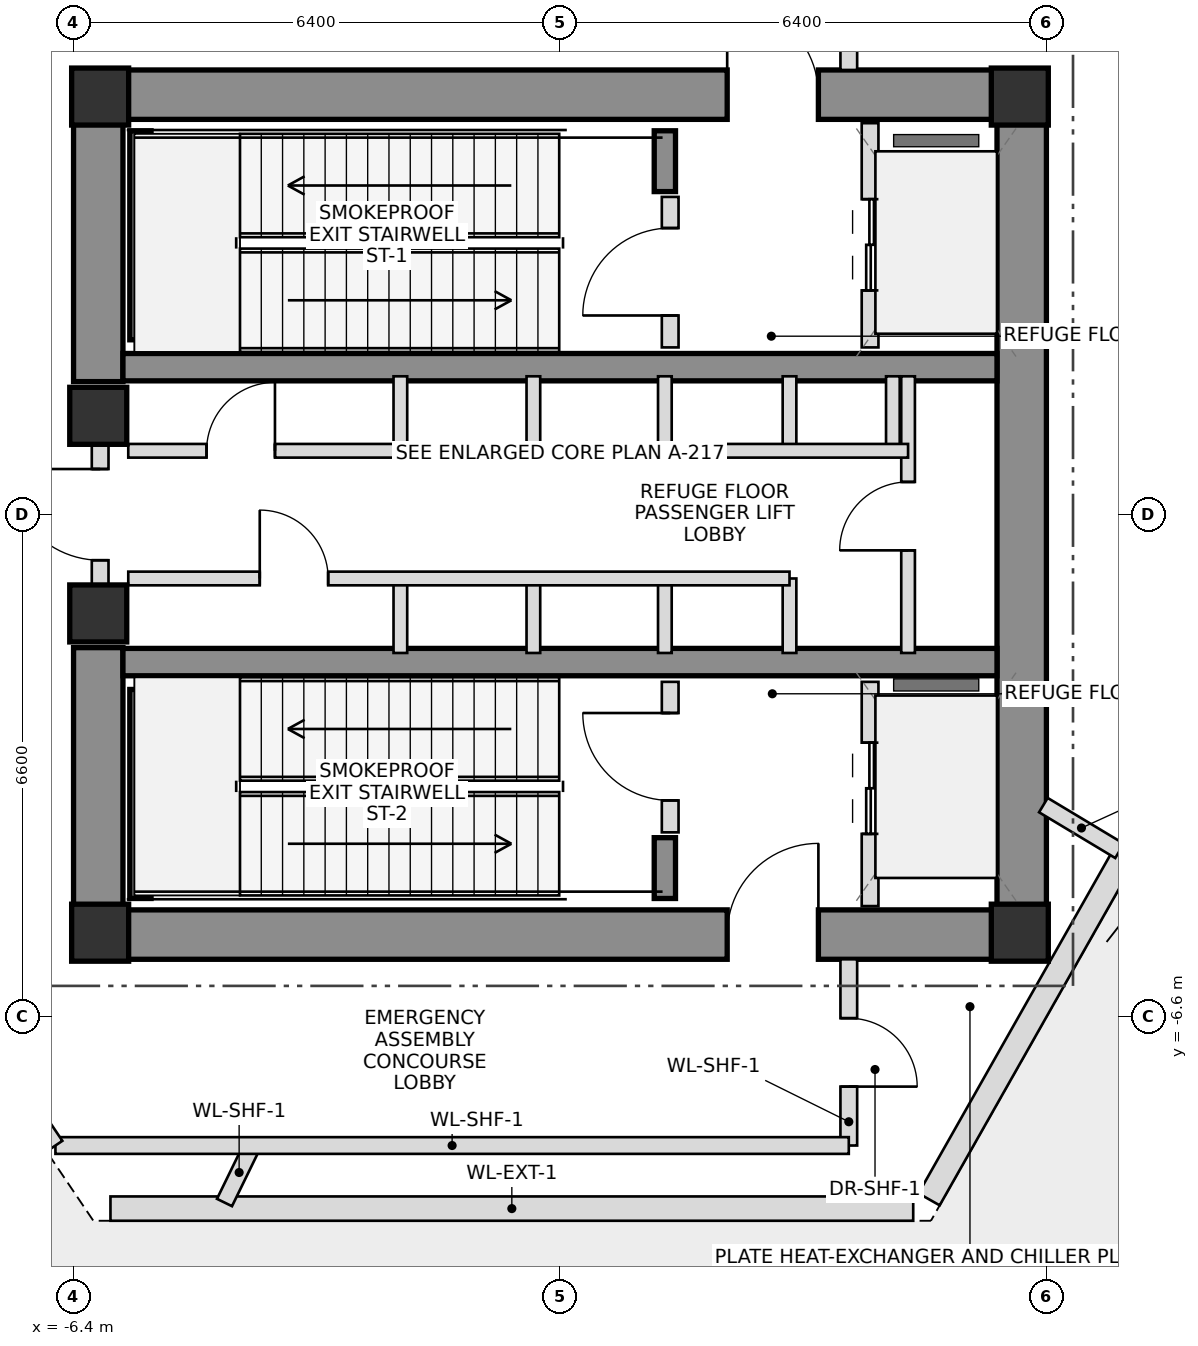
"""IFC4 building model, lengths in metres.
Left out: names, types, materials, properties, quantities, classifications, styles, units other than length and angle.
Written with IfcOpenShell. Run it as: python <this file> out.ifc"""

import sys

from ifc_helpers import new_model, si_unit, direction, frame, frame_2d, origin, origin_2d, place, context, subcontext, project, spatial, rectangle, extrude, source, transform, mapped, element, fill, save


model = new_model("IFC4")
c1 = context("Model", 3, precision=1e-05, world=origin(), true_north=direction((0.0, 1.0)))
c2 = subcontext(c1, "Body", "Model", "MODEL_VIEW")
j1 = project(units=[si_unit("LENGTHUNIT", "METRE"), si_unit("PLANEANGLEUNIT", "RADIAN")], contexts=[c1])
p1 = place(None, origin())
s1 = spatial("IfcSite", under=j1, at=p1, CompositionType="ELEMENT")
p2 = place(p1, origin())
s2 = spatial("IfcBuilding", under=s1, at=p2, CompositionType="ELEMENT")
p3 = place(p2, frame((0.0, 0.0, 186.35)))
s3 = spatial("IfcBuildingStorey", under=s2, at=p3, CompositionType="ELEMENT", Elevation=186.35)
m1 = source(origin(), c2, "Body", "SweptSolid", [
    extrude(rectangle(XDim=0.75, YDim=0.75, at=origin_2d()), origin(), (0.0, 0.0, 1.0), 5.1),
])
for number, where, z_axis, x_axis in (
    (1, (-6.05, -5.5, 0.0), (0.0, 0.0, 1.0), (1.0, 0.0, 0.0)),
    (2, (6.05, -5.5, 0.0), (0.0, 0.0, 1.0), (1.0, 0.0, 0.0)),
    (3, (6.05, 5.5, 0.0), (0.0, 0.0, 1.0), (1.0, 0.0, 0.0)),
    (4, (-6.05, 5.5, 0.0), (0.0, 0.0, 1.0), (1.0, 0.0, 0.0)),
):
    element("IfcColumn", number, at=place(p3, frame(where, z_axis=z_axis, x_axis=x_axis)), inside=s3, PredefinedType="COLUMN", context=c2, shape_type="MappedRepresentation", body=[
        mapped(m1, transform((0.0, 0.0, 0.0), scale=1.0)),
    ])
p4 = place(p3, frame((-6.4, 5.525, 0.0), z_axis=(0.0, 0.0, 1.0), x_axis=(1.0, 0.0, 0.0)))
e5 = element("IfcWall", 5, at=p4, inside=s3, PredefinedType="SHEAR", context=c2, shape_type="SweptSolid", body=[
    extrude(rectangle(XDim=12.8, YDim=0.65, at=frame_2d((6.4, 0.0))), origin(), (0.0, 0.0, 1.0), 5.1),
])
p5 = place(p4, frame((8.6, 0.0, 0.0)))
e6 = element("IfcOpeningElement", 6, at=p5, cuts=e5, PredefinedType="OPENING", context=c2, shape_type="SweptSolid", body=[
    extrude(rectangle(XDim=1.2, YDim=2.2, at=frame_2d((0.6, 1.1))), frame((0.0, 0.335, 0.0), z_axis=(0.0, -1.0, 0.0), x_axis=(1.0, 0.0, 0.0)), (0.0, 0.0, 1.0), 0.67),
])
p6 = place(p3, frame((-6.4, -5.525, 0.0), z_axis=(0.0, 0.0, 1.0), x_axis=(1.0, 0.0, 0.0)))
e7 = element("IfcWall", 7, at=p6, inside=s3, PredefinedType="SHEAR", context=c2, shape_type="SweptSolid", body=[
    extrude(rectangle(XDim=12.8, YDim=0.65, at=frame_2d((6.4, 0.0))), origin(), (0.0, 0.0, 1.0), 5.1),
])
p7 = place(p6, frame((8.6, 0.0, 0.0)))
e8 = element("IfcOpeningElement", 8, at=p7, cuts=e7, PredefinedType="OPENING", context=c2, shape_type="SweptSolid", body=[
    extrude(rectangle(XDim=1.2, YDim=2.2, at=frame_2d((0.6, 1.1))), frame((0.0, 0.335, 0.0), z_axis=(0.0, -1.0, 0.0), x_axis=(1.0, 0.0, 0.0)), (0.0, 0.0, 1.0), 0.67),
])
p8 = place(p3, frame((6.075, -5.2, 0.0), z_axis=(0.0, 0.0, 1.0), x_axis=(0.0, 1.0, 0.0)))
e9 = element("IfcWall", 9, at=p8, inside=s3, PredefinedType="SHEAR", context=c2, shape_type="SweptSolid", body=[
    extrude(rectangle(XDim=10.4, YDim=0.65, at=frame_2d((5.2, 0.0))), origin(), (0.0, 0.0, 1.0), 5.1),
])
for number, where, z_axis, x_axis in (
    (10, (-6.075, -5.2, 0.0), (0.0, 0.0, 1.0), (0.0, 1.0, 0.0)),
    (11, (-6.075, 1.75, 0.0), (0.0, 0.0, 1.0), (0.0, 1.0, 0.0)),
):
    element("IfcWall", number, at=place(p3, frame(where, z_axis=z_axis, x_axis=x_axis)), inside=s3, PredefinedType="SHEAR", context=c2, shape_type="SweptSolid", body=[
        extrude(rectangle(XDim=3.45, YDim=0.65, at=frame_2d((1.725, 0.0))), origin(), (0.0, 0.0, 1.0), 5.1),
    ])
for number, where, z_axis, x_axis in (
    (12, (-5.75, 1.94, 0.0), (0.0, 0.0, 1.0), (1.0, 0.0, 0.0)),
    (13, (-5.75, -1.94, 0.0), (0.0, 0.0, 1.0), (1.0, 0.0, 0.0)),
):
    element("IfcWall", number, at=place(p3, frame(where, z_axis=z_axis, x_axis=x_axis)), inside=s3, PredefinedType="SHEAR", context=c2, shape_type="SweptSolid", body=[
        extrude(rectangle(XDim=11.5, YDim=0.36, at=frame_2d((5.75, 0.0))), origin(), (0.0, 0.0, 1.0), 5.1),
    ])
p9 = place(p3, frame((-5.52, 2.3, 0.0), z_axis=(0.0, 0.0, 1.0), x_axis=(0.0, 1.0, 0.0)))
e14 = element("IfcWall", 14, at=p9, inside=s3, PredefinedType="SHEAR", context=c2, shape_type="SweptSolid", body=[
    extrude(rectangle(XDim=2.75, YDim=0.28, at=frame_2d((1.375, 0.0))), origin(), (0.0, 0.0, 1.0), 5.1),
])
p10 = place(p3, frame((1.38, 4.25, 0.0), z_axis=(0.0, 0.0, 1.0), x_axis=(0.0, 1.0, 0.0)))
e15 = element("IfcWall", 15, at=p10, inside=s3, PredefinedType="SHEAR", context=c2, shape_type="SweptSolid", body=[
    extrude(rectangle(XDim=0.8, YDim=0.28, at=frame_2d((0.4, 0.0))), origin(), (0.0, 0.0, 1.0), 5.1),
])
p11 = place(p3, frame((-5.52, -5.05, 0.0), z_axis=(0.0, 0.0, 1.0), x_axis=(0.0, 1.0, 0.0)))
e16 = element("IfcWall", 16, at=p11, inside=s3, PredefinedType="SHEAR", context=c2, shape_type="SweptSolid", body=[
    extrude(rectangle(XDim=2.75, YDim=0.28, at=frame_2d((1.375, 0.0))), origin(), (0.0, 0.0, 1.0), 5.1),
])
p12 = place(p3, frame((1.38, -5.05, 0.0), z_axis=(0.0, 0.0, 1.0), x_axis=(0.0, 1.0, 0.0)))
e17 = element("IfcWall", 17, at=p12, inside=s3, PredefinedType="SHEAR", context=c2, shape_type="SweptSolid", body=[
    extrude(rectangle(XDim=0.8, YDim=0.28, at=frame_2d((0.4, 0.0))), origin(), (0.0, 0.0, 1.0), 5.1),
])
for number, where, z_axis, x_axis in (
    (18, (-6.075, -1.3, 0.0), (0.0, 0.0, 1.0), (1.0, 0.0, 0.0)),
    (19, (-6.075, 1.3, 0.0), (0.0, 0.0, 1.0), (1.0, 0.0, 0.0)),
):
    element("IfcColumn", number, at=place(p3, frame(where, z_axis=z_axis, x_axis=x_axis)), inside=s3, PredefinedType="COLUMN", context=c2, shape_type="MappedRepresentation", body=[
        mapped(m1, transform((0.0, 0.0, 0.0), scale=1.0)),
    ])
p13 = place(p3, frame((-6.05, -0.95, 0.0), z_axis=(0.0, 0.0, 1.0), x_axis=(0.0, 1.0, 0.0)))
e20 = element("IfcWall", 20, at=p13, inside=s3, PredefinedType="PLUMBINGWALL", context=c2, shape_type="SweptSolid", body=[
    extrude(rectangle(XDim=1.9, YDim=0.22, at=frame_2d((0.95, 0.0))), origin(), (0.0, 0.0, 1.0), 3.88),
])
p14 = place(p13, frame((0.35, 0.0, 0.0)))
e21 = element("IfcOpeningElement", 21, at=p14, cuts=e20, PredefinedType="OPENING", context=c2, shape_type="SweptSolid", body=[
    extrude(rectangle(XDim=1.2, YDim=2.2, at=frame_2d((0.6, 1.1))), frame((0.0, 0.12, 0.0), z_axis=(0.0, -1.0, 0.0), x_axis=(1.0, 0.0, 0.0)), (0.0, 0.0, 1.0), 0.24),
])
p15 = place(p3, frame((1.45, 2.2, 0.0), z_axis=(0.0, 0.0, 1.0), x_axis=(0.0, 1.0, 0.0)))
e22 = element("IfcWall", 22, at=p15, inside=s3, PredefinedType="PLUMBINGWALL", context=c2, shape_type="SweptSolid", body=[
    extrude(rectangle(XDim=1.98, YDim=0.22, at=frame_2d((0.99, 0.0))), origin(), (0.0, 0.0, 1.0), 4.9),
])
p16 = place(p15, frame((0.42, 0.0, 0.0)))
e23 = element("IfcOpeningElement", 23, at=p16, cuts=e22, PredefinedType="OPENING", context=c2, shape_type="SweptSolid", body=[
    extrude(rectangle(XDim=1.15, YDim=2.15, at=frame_2d((0.575, 1.075))), frame((0.0, 0.12, 0.0), z_axis=(0.0, -1.0, 0.0), x_axis=(1.0, 0.0, 0.0)), (0.0, 0.0, 1.0), 0.24),
])
p17 = place(p3, frame((4.08, 2.2, 0.0), z_axis=(0.0, 0.0, 1.0), x_axis=(0.0, 1.0, 0.0)))
e24 = element("IfcWall", 24, at=p17, inside=s3, PredefinedType="PLUMBINGWALL", context=c2, shape_type="SweptSolid", body=[
    extrude(rectangle(XDim=2.95, YDim=0.22, at=frame_2d((1.475, 0.0))), origin(), (0.0, 0.0, 1.0), 4.9),
])
p18 = place(p17, frame((0.75, 0.0, 0.0)))
e25 = element("IfcOpeningElement", 25, at=p18, cuts=e24, PredefinedType="OPENING", context=c2, shape_type="SweptSolid", body=[
    extrude(rectangle(XDim=1.2, YDim=2.25, at=frame_2d((0.6, 1.125))), frame((0.0, 0.12, 0.0), z_axis=(0.0, -1.0, 0.0), x_axis=(1.0, 0.0, 0.0)), (0.0, 0.0, 1.0), 0.24),
])
p19 = place(p3, frame((1.45, -4.18, 0.0), z_axis=(0.0, 0.0, 1.0), x_axis=(0.0, 1.0, 0.0)))
e26 = element("IfcWall", 26, at=p19, inside=s3, PredefinedType="PLUMBINGWALL", context=c2, shape_type="SweptSolid", body=[
    extrude(rectangle(XDim=1.98, YDim=0.22, at=frame_2d((0.99, 0.0))), origin(), (0.0, 0.0, 1.0), 4.9),
])
p20 = place(p19, frame((0.42, 0.0, 0.0)))
e27 = element("IfcOpeningElement", 27, at=p20, cuts=e26, PredefinedType="OPENING", context=c2, shape_type="SweptSolid", body=[
    extrude(rectangle(XDim=1.15, YDim=2.15, at=frame_2d((0.575, 1.075))), frame((0.0, 0.12, 0.0), z_axis=(0.0, -1.0, 0.0), x_axis=(1.0, 0.0, 0.0)), (0.0, 0.0, 1.0), 0.24),
])
p21 = place(p3, frame((4.08, -5.15, 0.0), z_axis=(0.0, 0.0, 1.0), x_axis=(0.0, 1.0, 0.0)))
e28 = element("IfcWall", 28, at=p21, inside=s3, PredefinedType="PLUMBINGWALL", context=c2, shape_type="SweptSolid", body=[
    extrude(rectangle(XDim=2.95, YDim=0.22, at=frame_2d((1.475, 0.0))), origin(), (0.0, 0.0, 1.0), 4.9),
])
p22 = place(p21, frame((0.95, 0.0, 0.0)))
e29 = element("IfcOpeningElement", 29, at=p22, cuts=e28, PredefinedType="OPENING", context=c2, shape_type="SweptSolid", body=[
    extrude(rectangle(XDim=1.2, YDim=2.25, at=frame_2d((0.6, 1.125))), frame((0.0, 0.12, 0.0), z_axis=(0.0, -1.0, 0.0), x_axis=(1.0, 0.0, 0.0)), (0.0, 0.0, 1.0), 0.24),
])
for number, where, z_axis, x_axis in (
    (30, (-2.1, 0.84, 0.0), (0.0, 0.0, 1.0), (0.0, 1.0, 0.0)),
    (31, (-2.1, -1.82, 0.0), (0.0, 0.0, 1.0), (0.0, 1.0, 0.0)),
    (32, (-0.35, 0.84, 0.0), (0.0, 0.0, 1.0), (0.0, 1.0, 0.0)),
    (33, (-0.35, -1.82, 0.0), (0.0, 0.0, 1.0), (0.0, 1.0, 0.0)),
    (34, (1.38, 0.84, 0.0), (0.0, 0.0, 1.0), (0.0, 1.0, 0.0)),
    (35, (1.38, -1.82, 0.0), (0.0, 0.0, 1.0), (0.0, 1.0, 0.0)),
    (36, (3.02, 0.84, 0.0), (0.0, 0.0, 1.0), (0.0, 1.0, 0.0)),
    (37, (4.38, 0.84, 0.0), (0.0, 0.0, 1.0), (0.0, 1.0, 0.0)),
    (38, (3.02, -1.82, 0.0), (0.0, 0.0, 1.0), (0.0, 1.0, 0.0)),
):
    element("IfcWall", number, at=place(p3, frame(where, z_axis=z_axis, x_axis=x_axis)), inside=s3, PredefinedType="PLUMBINGWALL", context=c2, shape_type="SweptSolid", body=[
        extrude(rectangle(XDim=0.98, YDim=0.18, at=frame_2d((0.49, 0.0))), origin(), (0.0, 0.0, 1.0), 4.9),
    ])
p23 = place(p3, frame((4.58, -1.82, 0.0), z_axis=(0.0, 0.0, 1.0), x_axis=(0.0, 1.0, 0.0)))
e39 = element("IfcWall", 39, at=p23, inside=s3, PredefinedType="PLUMBINGWALL", context=c2, shape_type="SweptSolid", body=[
    extrude(rectangle(XDim=3.64, YDim=0.18, at=frame_2d((1.82, 0.0))), origin(), (0.0, 0.0, 1.0), 4.9),
])
p24 = place(p23, frame((1.35, 0.0, 0.0)))
e40 = element("IfcOpeningElement", 40, at=p24, cuts=e39, PredefinedType="OPENING", context=c2, shape_type="SweptSolid", body=[
    extrude(rectangle(XDim=0.9, YDim=2.05, at=frame_2d((0.45, 1.025))), frame((0.0, 0.1, 0.0), z_axis=(0.0, -1.0, 0.0), x_axis=(1.0, 0.0, 0.0)), (0.0, 0.0, 1.0), 0.2),
])
p25 = place(p3, frame((-5.68, 0.84, 0.0), z_axis=(0.0, 0.0, 1.0), x_axis=(1.0, 0.0, 0.0)))
e41 = element("IfcWall", 41, at=p25, inside=s3, PredefinedType="PLUMBINGWALL", context=c2, shape_type="SweptSolid", body=[
    extrude(rectangle(XDim=10.26, YDim=0.18, at=frame_2d((5.13, 0.0))), origin(), (0.0, 0.0, 1.0), 4.9),
])
p26 = place(p25, frame((1.03, 0.0, 0.0)))
e42 = element("IfcOpeningElement", 42, at=p26, cuts=e41, PredefinedType="OPENING", context=c2, shape_type="SweptSolid", body=[
    extrude(rectangle(XDim=0.9, YDim=2.05, at=frame_2d((0.45, 1.025))), frame((0.0, 0.1, 0.0), z_axis=(0.0, -1.0, 0.0), x_axis=(1.0, 0.0, 0.0)), (0.0, 0.0, 1.0), 0.2),
])
p27 = place(p3, frame((-5.68, -0.84, 0.0), z_axis=(0.0, 0.0, 1.0), x_axis=(1.0, 0.0, 0.0)))
e43 = element("IfcWall", 43, at=p27, inside=s3, PredefinedType="PLUMBINGWALL", context=c2, shape_type="SweptSolid", body=[
    extrude(rectangle(XDim=8.7, YDim=0.18, at=frame_2d((4.35, 0.0))), origin(), (0.0, 0.0, 1.0), 4.9),
])
p28 = place(p27, frame((1.73, 0.0, 0.0)))
e44 = element("IfcOpeningElement", 44, at=p28, cuts=e43, PredefinedType="OPENING", context=c2, shape_type="SweptSolid", body=[
    extrude(rectangle(XDim=0.9, YDim=2.05, at=frame_2d((0.45, 1.025))), frame((0.0, 0.1, 0.0), z_axis=(0.0, -1.0, 0.0), x_axis=(1.0, 0.0, 0.0)), (0.0, 0.0, 1.0), 0.2),
])
p29 = place(p3, frame((8.461, -2.648, 0.0), z_axis=(0.0, 0.0, 1.0), x_axis=(-0.493028580782, -0.870013114, 0.0)))
e45 = element("IfcWall", 45, at=p29, inside=s3, PredefinedType="SOLIDWALL", context=c2, shape_type="SweptSolid", body=[
    extrude(rectangle(XDim=7.311, YDim=0.32, at=frame_2d((3.656, 0.0))), origin(), (0.0, 0.0, 1.0), 3.555),
])
p30 = place(p3, frame((4.647, -9.13, 0.0), z_axis=(0.0, 0.0, 1.0), x_axis=(-1.0, 0.0, 0.0)))
e46 = element("IfcWall", 46, at=p30, inside=s3, PredefinedType="SOLIDWALL", context=c2, shape_type="SweptSolid", body=[
    extrude(rectangle(XDim=10.562, YDim=0.32, at=frame_2d((5.281, 0.0))), origin(), (0.0, 0.0, 1.0), 4.9),
])
p31 = place(p3, frame((-4.029, -8.26, 0.0), z_axis=(0.0, 0.0, 1.0), x_axis=(-0.438303234839, -0.898827165994, 0.0)))
e47 = element("IfcWall", 47, at=p31, inside=s3, PredefinedType="PLUMBINGWALL", context=c2, shape_type="SweptSolid", body=[
    extrude(rectangle(XDim=0.879, YDim=0.22, at=frame_2d((0.439, 0.0))), origin(), (0.0, 0.0, 1.0), 4.9),
])
p32 = place(p3, frame((6.36, -3.822, 0.0), z_axis=(0.0, 0.0, 1.0), x_axis=(0.857179622844, -0.515017566867, 0.0)))
e48 = element("IfcWall", 48, at=p32, inside=s3, PredefinedType="PLUMBINGWALL", context=c2, shape_type="SweptSolid", body=[
    extrude(rectangle(XDim=1.169, YDim=0.22, at=frame_2d((0.585, 0.0))), origin(), (0.0, 0.0, 1.0), 4.9),
])
p33 = place(p3, frame((3.8, -5.85, 0.0), z_axis=(0.0, 0.0, 1.0), x_axis=(0.0, -1.0, 0.0)))
e49 = element("IfcWall", 49, at=p33, inside=s3, PredefinedType="PLUMBINGWALL", context=c2, shape_type="SweptSolid", body=[
    extrude(rectangle(XDim=2.45, YDim=0.22, at=frame_2d((1.225, 0.0))), origin(), (0.0, 0.0, 1.0), 4.9),
])
p34 = place(p33, frame((0.775, 0.0, 0.0)))
e50 = element("IfcOpeningElement", 50, at=p34, cuts=e49, PredefinedType="OPENING", context=c2, shape_type="SweptSolid", body=[
    extrude(rectangle(XDim=0.9, YDim=2.05, at=frame_2d((0.45, 1.025))), frame((0.0, 0.12, 0.0), z_axis=(0.0, -1.0, 0.0), x_axis=(1.0, 0.0, 0.0)), (0.0, 0.0, 1.0), 0.24),
])
p35 = place(p3, frame((3.8, -8.3, 0.0), z_axis=(0.0, 0.0, 1.0), x_axis=(-1.0, 0.0, 0.0)))
e51 = element("IfcWall", 51, at=p35, inside=s3, PredefinedType="PLUMBINGWALL", context=c2, shape_type="SweptSolid", body=[
    extrude(rectangle(XDim=10.438, YDim=0.22, at=frame_2d((5.219, 0.0))), origin(), (0.0, 0.0, 1.0), 4.9),
])
p36 = place(p3, frame((-6.638, -8.3, 0.0), z_axis=(0.0, 0.0, 1.0), x_axis=(-0.559221585946, 0.829018225259, 0.0)))
e52 = element("IfcWall", 52, at=p36, inside=s3, PredefinedType="PLUMBINGWALL", context=c2, shape_type="SweptSolid", body=[
    extrude(rectangle(XDim=3.955, YDim=0.22, at=frame_2d((1.978, 0.0))), origin(), (0.0, 0.0, 1.0), 3.555),
])
p37 = place(p3, frame((3.8, 8.3, 0.0), z_axis=(0.0, 0.0, 1.0), x_axis=(0.0, -1.0, 0.0)))
e53 = element("IfcWall", 53, at=p37, inside=s3, PredefinedType="PLUMBINGWALL", context=c2, shape_type="SweptSolid", body=[
    extrude(rectangle(XDim=2.45, YDim=0.22, at=frame_2d((1.225, 0.0))), origin(), (0.0, 0.0, 1.0), 4.9),
])
p38 = place(p5, origin())
e54 = element("IfcDoor", 54, at=p38, inside=s3, OperationType="SINGLE_SWING_LEFT", PredefinedType="DOOR", context=c2, shape_type="SweptSolid", body=[
    extrude(rectangle(XDim=1.2, YDim=2.2, at=frame_2d((0.6, 1.1))), frame((0.0, 0.025, 0.0), z_axis=(0.0, -1.0, 0.0), x_axis=(1.0, 0.0, 0.0)), (0.0, 0.0, 1.0), 0.05),
])
fill(e6, e54)
p39 = place(p7, origin())
e55 = element("IfcDoor", 55, at=p39, inside=s3, OperationType="SINGLE_SWING_RIGHT", PredefinedType="DOOR", context=c2, shape_type="SweptSolid", body=[
    extrude(rectangle(XDim=1.2, YDim=2.2, at=frame_2d((0.6, 1.1))), frame((0.0, 0.025, 0.0), z_axis=(0.0, -1.0, 0.0), x_axis=(1.0, 0.0, 0.0)), (0.0, 0.0, 1.0), 0.05),
])
fill(e8, e55)
p40 = place(p14, origin())
e56 = element("IfcDoor", 56, at=p40, inside=s3, OperationType="SINGLE_SWING_RIGHT", PredefinedType="DOOR", context=c2, shape_type="SweptSolid", body=[
    extrude(rectangle(XDim=1.2, YDim=2.2, at=frame_2d((0.6, 1.1))), frame((0.0, 0.025, 0.0), z_axis=(0.0, -1.0, 0.0), x_axis=(1.0, 0.0, 0.0)), (0.0, 0.0, 1.0), 0.05),
])
fill(e21, e56)
p41 = place(p16, origin())
e57 = element("IfcDoor", 57, at=p41, inside=s3, OperationType="SINGLE_SWING_LEFT", PredefinedType="DOOR", context=c2, shape_type="SweptSolid", body=[
    extrude(rectangle(XDim=1.15, YDim=2.15, at=frame_2d((0.575, 1.075))), frame((0.0, 0.025, 0.0), z_axis=(0.0, -1.0, 0.0), x_axis=(1.0, 0.0, 0.0)), (0.0, 0.0, 1.0), 0.05),
])
fill(e23, e57)
p42 = place(p18, origin())
e58 = element("IfcDoor", 58, at=p42, inside=s3, OperationType="DOUBLE_DOOR_SLIDING", PredefinedType="DOOR", context=c2, shape_type="SweptSolid", body=[
    extrude(rectangle(XDim=1.2, YDim=2.25, at=frame_2d((0.6, 1.125))), frame((0.0, 0.025, 0.0), z_axis=(0.0, -1.0, 0.0), x_axis=(1.0, 0.0, 0.0)), (0.0, 0.0, 1.0), 0.05),
])
fill(e25, e58)
p43 = place(p20, origin())
e59 = element("IfcDoor", 59, at=p43, inside=s3, OperationType="SINGLE_SWING_RIGHT", PredefinedType="DOOR", context=c2, shape_type="SweptSolid", body=[
    extrude(rectangle(XDim=1.15, YDim=2.15, at=frame_2d((0.575, 1.075))), frame((0.0, 0.025, 0.0), z_axis=(0.0, -1.0, 0.0), x_axis=(1.0, 0.0, 0.0)), (0.0, 0.0, 1.0), 0.05),
])
fill(e27, e59)
p44 = place(p22, origin())
e60 = element("IfcDoor", 60, at=p44, inside=s3, OperationType="DOUBLE_DOOR_SLIDING", PredefinedType="DOOR", context=c2, shape_type="SweptSolid", body=[
    extrude(rectangle(XDim=1.2, YDim=2.25, at=frame_2d((0.6, 1.125))), frame((0.0, 0.025, 0.0), z_axis=(0.0, -1.0, 0.0), x_axis=(1.0, 0.0, 0.0)), (0.0, 0.0, 1.0), 0.05),
])
fill(e29, e60)
p45 = place(p24, origin())
e61 = element("IfcDoor", 61, at=p45, inside=s3, OperationType="SINGLE_SWING_LEFT", PredefinedType="DOOR", context=c2, shape_type="SweptSolid", body=[
    extrude(rectangle(XDim=0.9, YDim=2.05, at=frame_2d((0.45, 1.025))), frame((0.0, 0.025, 0.0), z_axis=(0.0, -1.0, 0.0), x_axis=(1.0, 0.0, 0.0)), (0.0, 0.0, 1.0), 0.05),
])
fill(e40, e61)
p46 = place(p26, origin())
e62 = element("IfcDoor", 62, at=p46, inside=s3, OperationType="SINGLE_SWING_RIGHT", PredefinedType="DOOR", context=c2, shape_type="SweptSolid", body=[
    extrude(rectangle(XDim=0.9, YDim=2.05, at=frame_2d((0.45, 1.025))), frame((0.0, 0.025, 0.0), z_axis=(0.0, -1.0, 0.0), x_axis=(1.0, 0.0, 0.0)), (0.0, 0.0, 1.0), 0.05),
])
fill(e42, e62)
p47 = place(p28, origin())
e63 = element("IfcDoor", 63, at=p47, inside=s3, OperationType="SINGLE_SWING_LEFT", PredefinedType="DOOR", context=c2, shape_type="SweptSolid", body=[
    extrude(rectangle(XDim=0.9, YDim=2.05, at=frame_2d((0.45, 1.025))), frame((0.0, 0.025, 0.0), z_axis=(0.0, -1.0, 0.0), x_axis=(1.0, 0.0, 0.0)), (0.0, 0.0, 1.0), 0.05),
])
fill(e44, e63)
p48 = place(p34, origin())
e64 = element("IfcDoor", 64, at=p48, inside=s3, OperationType="SINGLE_SWING_RIGHT", PredefinedType="DOOR", context=c2, shape_type="SweptSolid", body=[
    extrude(rectangle(XDim=0.9, YDim=2.05, at=frame_2d((0.45, 1.025))), frame((0.0, 0.025, 0.0), z_axis=(0.0, -1.0, 0.0), x_axis=(1.0, 0.0, 0.0)), (0.0, 0.0, 1.0), 0.05),
])
fill(e50, e64)
save(model, sys.argv[1])
